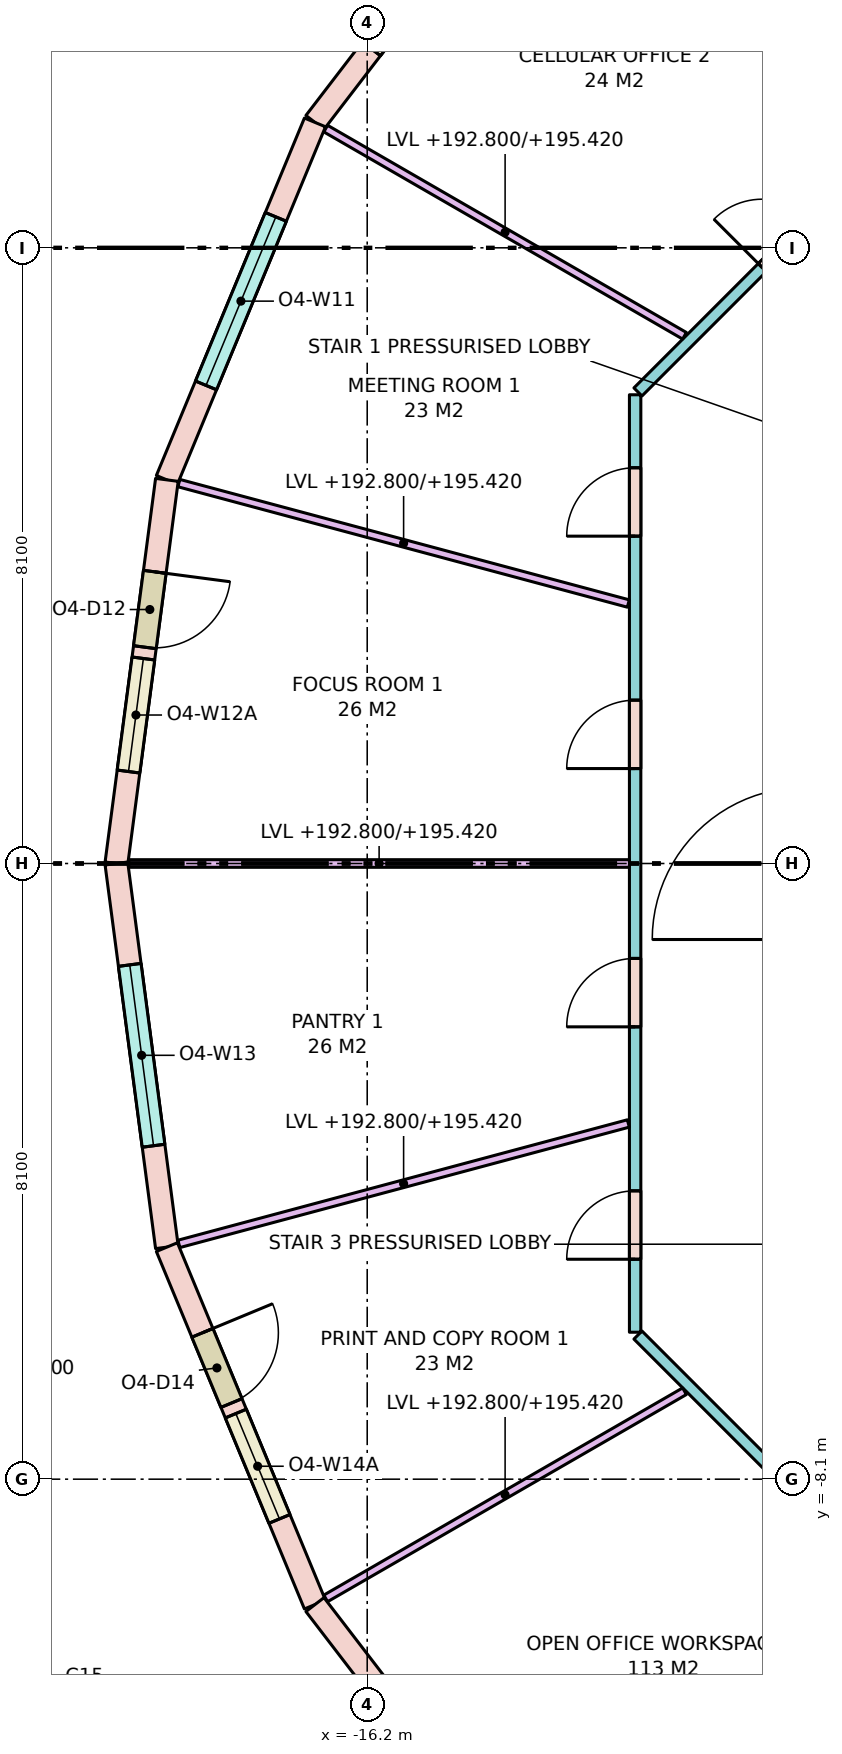
"""IFC4 building model, lengths in metres.
Left out: names, types, materials, properties, quantities, classifications, styles, units other than length and angle.
Written with IfcOpenShell. Run it as: python <this file> out.ifc"""

import sys

from ifc_helpers import new_model, si_unit, direction, frame, frame_2d, origin, place, context, subcontext, project, spatial, rectangle, extrude, element, fill, save


model = new_model("IFC4")
c1 = context("Model", 3, precision=1e-05, world=origin(), true_north=direction((0.0, 1.0)))
c2 = subcontext(c1, "Body", "Model", "MODEL_VIEW")
j1 = project(units=[si_unit("LENGTHUNIT", "METRE"), si_unit("PLANEANGLEUNIT", "RADIAN")], contexts=[c1])
p1 = place(None, origin())
s1 = spatial("IfcSite", under=j1, at=p1, CompositionType="ELEMENT")
p2 = place(p1, origin())
s2 = spatial("IfcBuilding", under=s1, at=p2, CompositionType="ELEMENT")
p3 = place(p2, frame((0.0, 0.0, 192.8)))
s3 = spatial("IfcBuildingStorey", under=s2, at=p3, CompositionType="ELEMENT", Elevation=192.8)
p4 = place(p3, frame((-13.789, 13.789, 0.0), z_axis=(0.0, 0.0, 1.0), x_axis=(-0.608757714995, -0.79335619014, 0.0)))
e1 = element("IfcWall", 1, at=p4, inside=s3, PredefinedType="STANDARD", context=c2, shape_type="SweptSolid", body=[
    extrude(rectangle(XDim=5.091, YDim=0.3, at=frame_2d((2.545, 0.0))), origin(), (0.0, 0.0, 1.0), 3.42),
])
p5 = place(p4, frame((1.22, 0.0, 0.0)))
e2 = element("IfcOpeningElement", 2, at=p5, cuts=e1, PredefinedType="OPENING", context=c2, shape_type="SweptSolid", body=[
    extrude(rectangle(XDim=1.0, YDim=2.4, at=frame_2d((0.5, 1.2))), frame((0.0, 0.16, 0.0), z_axis=(0.0, -1.0, 0.0), x_axis=(1.0, 0.0, 0.0)), (0.0, 0.0, 1.0), 0.32),
])
p6 = place(p4, frame((2.37, 0.0, 0.8)))
e3 = element("IfcOpeningElement", 3, at=p6, cuts=e1, PredefinedType="OPENING", context=c2, shape_type="SweptSolid", body=[
    extrude(rectangle(XDim=1.5, YDim=2.4, at=frame_2d((0.75, 1.2))), frame((0.0, 0.16, 0.0), z_axis=(0.0, -1.0, 0.0), x_axis=(1.0, 0.0, 0.0)), (0.0, 0.0, 1.0), 0.32),
])
p7 = place(p3, frame((-16.887, 9.75, 0.0), z_axis=(0.0, 0.0, 1.0), x_axis=(-0.382724538613, -0.923862504675, 0.0)))
e4 = element("IfcWall", 4, at=p7, inside=s3, PredefinedType="STANDARD", context=c2, shape_type="SweptSolid", body=[
    extrude(rectangle(XDim=5.091, YDim=0.3, at=frame_2d((2.545, 0.0))), origin(), (0.0, 0.0, 1.0), 3.42),
])
p8 = place(p7, frame((1.345, 0.0, 0.8)))
e5 = element("IfcOpeningElement", 5, at=p8, cuts=e4, PredefinedType="OPENING", context=c2, shape_type="SweptSolid", body=[
    extrude(rectangle(XDim=2.4, YDim=2.4, at=frame_2d((1.2, 1.2))), frame((0.0, 0.16, 0.0), z_axis=(0.0, -1.0, 0.0), x_axis=(1.0, 0.0, 0.0)), (0.0, 0.0, 1.0), 0.32),
])
p9 = place(p3, frame((-18.836, 5.047, 0.0), z_axis=(0.0, 0.0, 1.0), x_axis=(-0.130495451964, -0.99144890792, 0.0)))
e6 = element("IfcWall", 6, at=p9, inside=s3, PredefinedType="STANDARD", context=c2, shape_type="SweptSolid", body=[
    extrude(rectangle(XDim=5.091, YDim=0.3, at=frame_2d((2.545, 0.0))), origin(), (0.0, 0.0, 1.0), 3.42),
])
p10 = place(p9, frame((1.22, 0.0, 0.0)))
e7 = element("IfcOpeningElement", 7, at=p10, cuts=e6, PredefinedType="OPENING", context=c2, shape_type="SweptSolid", body=[
    extrude(rectangle(XDim=1.0, YDim=2.4, at=frame_2d((0.5, 1.2))), frame((0.0, 0.16, 0.0), z_axis=(0.0, -1.0, 0.0), x_axis=(1.0, 0.0, 0.0)), (0.0, 0.0, 1.0), 0.32),
])
p11 = place(p9, frame((2.37, 0.0, 0.8)))
e8 = element("IfcOpeningElement", 8, at=p11, cuts=e6, PredefinedType="OPENING", context=c2, shape_type="SweptSolid", body=[
    extrude(rectangle(XDim=1.5, YDim=2.4, at=frame_2d((0.75, 1.2))), frame((0.0, 0.16, 0.0), z_axis=(0.0, -1.0, 0.0), x_axis=(1.0, 0.0, 0.0)), (0.0, 0.0, 1.0), 0.32),
])
p12 = place(p3, frame((-19.5, 0.0, 0.0), z_axis=(0.0, 0.0, 1.0), x_axis=(0.130495451964, -0.99144890792, 0.0)))
e9 = element("IfcWall", 9, at=p12, inside=s3, PredefinedType="STANDARD", context=c2, shape_type="SweptSolid", body=[
    extrude(rectangle(XDim=5.091, YDim=0.3, at=frame_2d((2.545, 0.0))), origin(), (0.0, 0.0, 1.0), 3.42),
])
p13 = place(p12, frame((1.345, 0.0, 0.8)))
e10 = element("IfcOpeningElement", 10, at=p13, cuts=e9, PredefinedType="OPENING", context=c2, shape_type="SweptSolid", body=[
    extrude(rectangle(XDim=2.4, YDim=2.4, at=frame_2d((1.2, 1.2))), frame((0.0, 0.16, 0.0), z_axis=(0.0, -1.0, 0.0), x_axis=(1.0, 0.0, 0.0)), (0.0, 0.0, 1.0), 0.32),
])
p14 = place(p3, frame((-18.836, -5.047, 0.0), z_axis=(0.0, 0.0, 1.0), x_axis=(0.382724538613, -0.923862504675, 0.0)))
e11 = element("IfcWall", 11, at=p14, inside=s3, PredefinedType="STANDARD", context=c2, shape_type="SweptSolid", body=[
    extrude(rectangle(XDim=5.091, YDim=0.3, at=frame_2d((2.545, 0.0))), origin(), (0.0, 0.0, 1.0), 3.42),
])
p15 = place(p14, frame((1.22, 0.0, 0.0)))
e12 = element("IfcOpeningElement", 12, at=p15, cuts=e11, PredefinedType="OPENING", context=c2, shape_type="SweptSolid", body=[
    extrude(rectangle(XDim=1.0, YDim=2.4, at=frame_2d((0.5, 1.2))), frame((0.0, 0.16, 0.0), z_axis=(0.0, -1.0, 0.0), x_axis=(1.0, 0.0, 0.0)), (0.0, 0.0, 1.0), 0.32),
])
p16 = place(p14, frame((2.37, 0.0, 0.8)))
e13 = element("IfcOpeningElement", 13, at=p16, cuts=e11, PredefinedType="OPENING", context=c2, shape_type="SweptSolid", body=[
    extrude(rectangle(XDim=1.5, YDim=2.4, at=frame_2d((0.75, 1.2))), frame((0.0, 0.16, 0.0), z_axis=(0.0, -1.0, 0.0), x_axis=(1.0, 0.0, 0.0)), (0.0, 0.0, 1.0), 0.32),
])
p17 = place(p3, frame((-16.887, -9.75, 0.0), z_axis=(0.0, 0.0, 1.0), x_axis=(0.608757714995, -0.79335619014, 0.0)))
e14 = element("IfcWall", 14, at=p17, inside=s3, PredefinedType="STANDARD", context=c2, shape_type="SweptSolid", body=[
    extrude(rectangle(XDim=5.091, YDim=0.3, at=frame_2d((2.545, 0.0))), origin(), (0.0, 0.0, 1.0), 3.42),
])
p18 = place(p17, frame((1.345, 0.0, 0.8)))
e15 = element("IfcOpeningElement", 15, at=p18, cuts=e14, PredefinedType="OPENING", context=c2, shape_type="SweptSolid", body=[
    extrude(rectangle(XDim=2.4, YDim=2.4, at=frame_2d((1.2, 1.2))), frame((0.0, 0.16, 0.0), z_axis=(0.0, -1.0, 0.0), x_axis=(1.0, 0.0, 0.0)), (0.0, 0.0, 1.0), 0.32),
])
p19 = place(p3, frame((-8.204, -10.638, 0.0), z_axis=(0.0, 0.0, 1.0), x_axis=(-0.707106781187, 0.707106781187, 0.0)))
e16 = element("IfcWall", 16, at=p19, inside=s3, PredefinedType="PARTITIONING", context=c2, shape_type="SweptSolid", body=[
    extrude(rectangle(XDim=6.271, YDim=0.15, at=frame_2d((3.135, 0.0))), origin(), (0.0, 0.0, 1.0), 2.62),
])
p20 = place(p3, frame((-12.675, -6.167, 0.0), z_axis=(0.0, 0.0, 1.0), x_axis=(0.0, 1.0, 0.0)))
e17 = element("IfcWall", 17, at=p20, inside=s3, PredefinedType="PARTITIONING", context=c2, shape_type="SweptSolid", body=[
    extrude(rectangle(XDim=12.333, YDim=0.15, at=frame_2d((6.167, 0.0))), origin(), (0.0, 0.0, 1.0), 2.62),
])
p21 = place(p20, frame((10.473, 0.0, 0.0)))
e18 = element("IfcOpeningElement", 18, at=p21, cuts=e17, PredefinedType="OPENING", context=c2, shape_type="SweptSolid", body=[
    extrude(rectangle(XDim=0.9, YDim=2.1, at=frame_2d((0.45, 1.05))), frame((0.0, 0.085, 0.0), z_axis=(0.0, -1.0, 0.0), x_axis=(1.0, 0.0, 0.0)), (0.0, 0.0, 1.0), 0.17),
])
p22 = place(p20, frame((7.416, 0.0, 0.0)))
e19 = element("IfcOpeningElement", 19, at=p22, cuts=e17, PredefinedType="OPENING", context=c2, shape_type="SweptSolid", body=[
    extrude(rectangle(XDim=0.9, YDim=2.1, at=frame_2d((0.45, 1.05))), frame((0.0, 0.085, 0.0), z_axis=(0.0, -1.0, 0.0), x_axis=(1.0, 0.0, 0.0)), (0.0, 0.0, 1.0), 0.17),
])
p23 = place(p20, frame((4.018, 0.0, 0.0)))
e20 = element("IfcOpeningElement", 20, at=p23, cuts=e17, PredefinedType="OPENING", context=c2, shape_type="SweptSolid", body=[
    extrude(rectangle(XDim=0.9, YDim=2.1, at=frame_2d((0.45, 1.05))), frame((0.0, 0.085, 0.0), z_axis=(0.0, -1.0, 0.0), x_axis=(1.0, 0.0, 0.0)), (0.0, 0.0, 1.0), 0.17),
])
p24 = place(p20, frame((0.96, 0.0, 0.0)))
e21 = element("IfcOpeningElement", 21, at=p24, cuts=e17, PredefinedType="OPENING", context=c2, shape_type="SweptSolid", body=[
    extrude(rectangle(XDim=0.9, YDim=2.1, at=frame_2d((0.45, 1.05))), frame((0.0, 0.085, 0.0), z_axis=(0.0, -1.0, 0.0), x_axis=(1.0, 0.0, 0.0)), (0.0, 0.0, 1.0), 0.17),
])
p25 = place(p3, frame((-12.638, 6.204, 0.0), z_axis=(0.0, 0.0, 1.0), x_axis=(0.707106781187, 0.707106781187, 0.0)))
e22 = element("IfcWall", 22, at=p25, inside=s3, PredefinedType="PARTITIONING", context=c2, shape_type="SweptSolid", body=[
    extrude(rectangle(XDim=6.271, YDim=0.15, at=frame_2d((3.135, 0.0))), origin(), (0.0, 0.0, 1.0), 2.62),
])
p26 = place(p25, frame((4.935, 0.0, 0.0)))
e23 = element("IfcOpeningElement", 23, at=p26, cuts=e22, PredefinedType="OPENING", context=c2, shape_type="SweptSolid", body=[
    extrude(rectangle(XDim=0.9, YDim=2.1, at=frame_2d((0.45, 1.05))), frame((0.0, 0.085, 0.0), z_axis=(0.0, -1.0, 0.0), x_axis=(1.0, 0.0, 0.0)), (0.0, 0.0, 1.0), 0.17),
])
p27 = place(p25, frame((2.314, 0.0, 0.0)))
e24 = element("IfcOpeningElement", 24, at=p27, cuts=e22, PredefinedType="OPENING", context=c2, shape_type="SweptSolid", body=[
    extrude(rectangle(XDim=0.9, YDim=2.1, at=frame_2d((0.45, 1.05))), frame((0.0, 0.085, 0.0), z_axis=(0.0, -1.0, 0.0), x_axis=(1.0, 0.0, 0.0)), (0.0, 0.0, 1.0), 0.17),
])
p28 = place(p3, frame((-9.474, 9.474, 0.0), z_axis=(0.0, 0.0, 1.0), x_axis=(-0.707106781187, 0.707106781187, 0.0)))
e25 = element("IfcWall", 25, at=p28, inside=s3, PredefinedType="PARTITIONING", context=c2, shape_type="SweptSolid", body=[
    extrude(rectangle(XDim=5.938, YDim=0.1, at=frame_2d((2.969, 0.0))), origin(), (0.0, 0.0, 1.0), 2.62),
])
p29 = place(p3, frame((-12.025, 6.943, 0.0), z_axis=(0.0, 0.0, 1.0), x_axis=(-0.866029712004, 0.499992537871, 0.0)))
e26 = element("IfcWall", 26, at=p29, inside=s3, PredefinedType="PARTITIONING", context=c2, shape_type="SweptSolid", body=[
    extrude(rectangle(XDim=5.451, YDim=0.1, at=frame_2d((2.726, 0.0))), origin(), (0.0, 0.0, 1.0), 2.62),
])
p30 = place(p3, frame((-12.764, 3.42, 0.0), z_axis=(0.0, 0.0, 1.0), x_axis=(-0.965925800266, 0.258819142221, 0.0)))
e27 = element("IfcWall", 27, at=p30, inside=s3, PredefinedType="PARTITIONING", context=c2, shape_type="SweptSolid", body=[
    extrude(rectangle(XDim=6.122, YDim=0.1, at=frame_2d((3.061, 0.0))), origin(), (0.0, 0.0, 1.0), 2.62),
])
p31 = place(p3, frame((-12.75, 0.0, 0.0), z_axis=(0.0, 0.0, 1.0), x_axis=(-1.0, 0.0, 0.0)))
e28 = element("IfcWall", 28, at=p31, inside=s3, PredefinedType="PARTITIONING", context=c2, shape_type="SweptSolid", body=[
    extrude(rectangle(XDim=6.587, YDim=0.1, at=frame_2d((3.293, 0.0))), origin(), (0.0, 0.0, 1.0), 2.62),
])
p32 = place(p3, frame((-12.764, -3.42, 0.0), z_axis=(0.0, 0.0, 1.0), x_axis=(-0.965925800266, -0.258819142221, 0.0)))
e29 = element("IfcWall", 29, at=p32, inside=s3, PredefinedType="PARTITIONING", context=c2, shape_type="SweptSolid", body=[
    extrude(rectangle(XDim=6.122, YDim=0.1, at=frame_2d((3.061, 0.0))), origin(), (0.0, 0.0, 1.0), 2.62),
])
p33 = place(p3, frame((-12.025, -6.943, 0.0), z_axis=(0.0, 0.0, 1.0), x_axis=(-0.866029712004, -0.499992537871, 0.0)))
e30 = element("IfcWall", 30, at=p33, inside=s3, PredefinedType="PARTITIONING", context=c2, shape_type="SweptSolid", body=[
    extrude(rectangle(XDim=5.451, YDim=0.1, at=frame_2d((2.726, 0.0))), origin(), (0.0, 0.0, 1.0), 2.62),
])
p34 = place(p8, origin())
e31 = element("IfcWindow", 31, at=p34, inside=s3, PartitioningType="SINGLE_PANEL", PredefinedType="WINDOW", context=c2, shape_type="SweptSolid", body=[
    extrude(rectangle(XDim=2.4, YDim=2.4, at=frame_2d((1.2, 1.2))), frame((0.0, 0.03, 0.0), z_axis=(0.0, -1.0, 0.0), x_axis=(1.0, 0.0, 0.0)), (0.0, 0.0, 1.0), 0.06),
])
fill(e5, e31)
p35 = place(p10, origin())
e32 = element("IfcDoor", 32, at=p35, inside=s3, OperationType="SINGLE_SWING_LEFT", PredefinedType="DOOR", context=c2, shape_type="SweptSolid", body=[
    extrude(rectangle(XDim=1.0, YDim=2.4, at=frame_2d((0.5, 1.2))), frame((0.0, 0.025, 0.0), z_axis=(0.0, -1.0, 0.0), x_axis=(1.0, 0.0, 0.0)), (0.0, 0.0, 1.0), 0.05),
])
fill(e7, e32)
p36 = place(p11, origin())
e33 = element("IfcWindow", 33, at=p36, inside=s3, PartitioningType="SINGLE_PANEL", PredefinedType="WINDOW", context=c2, shape_type="SweptSolid", body=[
    extrude(rectangle(XDim=1.5, YDim=2.4, at=frame_2d((0.75, 1.2))), frame((0.0, 0.03, 0.0), z_axis=(0.0, -1.0, 0.0), x_axis=(1.0, 0.0, 0.0)), (0.0, 0.0, 1.0), 0.06),
])
fill(e8, e33)
p37 = place(p13, origin())
e34 = element("IfcWindow", 34, at=p37, inside=s3, PartitioningType="SINGLE_PANEL", PredefinedType="WINDOW", context=c2, shape_type="SweptSolid", body=[
    extrude(rectangle(XDim=2.4, YDim=2.4, at=frame_2d((1.2, 1.2))), frame((0.0, 0.03, 0.0), z_axis=(0.0, -1.0, 0.0), x_axis=(1.0, 0.0, 0.0)), (0.0, 0.0, 1.0), 0.06),
])
fill(e10, e34)
p38 = place(p15, origin())
e35 = element("IfcDoor", 35, at=p38, inside=s3, OperationType="SINGLE_SWING_LEFT", PredefinedType="DOOR", context=c2, shape_type="SweptSolid", body=[
    extrude(rectangle(XDim=1.0, YDim=2.4, at=frame_2d((0.5, 1.2))), frame((0.0, 0.025, 0.0), z_axis=(0.0, -1.0, 0.0), x_axis=(1.0, 0.0, 0.0)), (0.0, 0.0, 1.0), 0.05),
])
fill(e12, e35)
p39 = place(p16, origin())
e36 = element("IfcWindow", 36, at=p39, inside=s3, PartitioningType="SINGLE_PANEL", PredefinedType="WINDOW", context=c2, shape_type="SweptSolid", body=[
    extrude(rectangle(XDim=1.5, YDim=2.4, at=frame_2d((0.75, 1.2))), frame((0.0, 0.03, 0.0), z_axis=(0.0, -1.0, 0.0), x_axis=(1.0, 0.0, 0.0)), (0.0, 0.0, 1.0), 0.06),
])
fill(e13, e36)
p40 = place(p27, origin())
e37 = element("IfcDoor", 37, at=p40, inside=s3, OperationType="SINGLE_SWING_LEFT", PredefinedType="DOOR", context=c2, shape_type="SweptSolid", body=[
    extrude(rectangle(XDim=0.9, YDim=2.1, at=frame_2d((0.45, 1.05))), frame((0.0, 0.025, 0.0), z_axis=(0.0, -1.0, 0.0), x_axis=(1.0, 0.0, 0.0)), (0.0, 0.0, 1.0), 0.05),
])
fill(e24, e37)
p41 = place(p21, origin())
e38 = element("IfcDoor", 38, at=p41, inside=s3, OperationType="SINGLE_SWING_LEFT", PredefinedType="DOOR", context=c2, shape_type="SweptSolid", body=[
    extrude(rectangle(XDim=0.9, YDim=2.1, at=frame_2d((0.45, 1.05))), frame((0.0, 0.025, 0.0), z_axis=(0.0, -1.0, 0.0), x_axis=(1.0, 0.0, 0.0)), (0.0, 0.0, 1.0), 0.05),
])
fill(e18, e38)
p42 = place(p22, origin())
e39 = element("IfcDoor", 39, at=p42, inside=s3, OperationType="SINGLE_SWING_LEFT", PredefinedType="DOOR", context=c2, shape_type="SweptSolid", body=[
    extrude(rectangle(XDim=0.9, YDim=2.1, at=frame_2d((0.45, 1.05))), frame((0.0, 0.025, 0.0), z_axis=(0.0, -1.0, 0.0), x_axis=(1.0, 0.0, 0.0)), (0.0, 0.0, 1.0), 0.05),
])
fill(e19, e39)
p43 = place(p23, origin())
e40 = element("IfcDoor", 40, at=p43, inside=s3, OperationType="SINGLE_SWING_LEFT", PredefinedType="DOOR", context=c2, shape_type="SweptSolid", body=[
    extrude(rectangle(XDim=0.9, YDim=2.1, at=frame_2d((0.45, 1.05))), frame((0.0, 0.025, 0.0), z_axis=(0.0, -1.0, 0.0), x_axis=(1.0, 0.0, 0.0)), (0.0, 0.0, 1.0), 0.05),
])
fill(e20, e40)
p44 = place(p24, origin())
e41 = element("IfcDoor", 41, at=p44, inside=s3, OperationType="SINGLE_SWING_LEFT", PredefinedType="DOOR", context=c2, shape_type="SweptSolid", body=[
    extrude(rectangle(XDim=0.9, YDim=2.1, at=frame_2d((0.45, 1.05))), frame((0.0, 0.025, 0.0), z_axis=(0.0, -1.0, 0.0), x_axis=(1.0, 0.0, 0.0)), (0.0, 0.0, 1.0), 0.05),
])
fill(e21, e41)
save(model, sys.argv[1])
